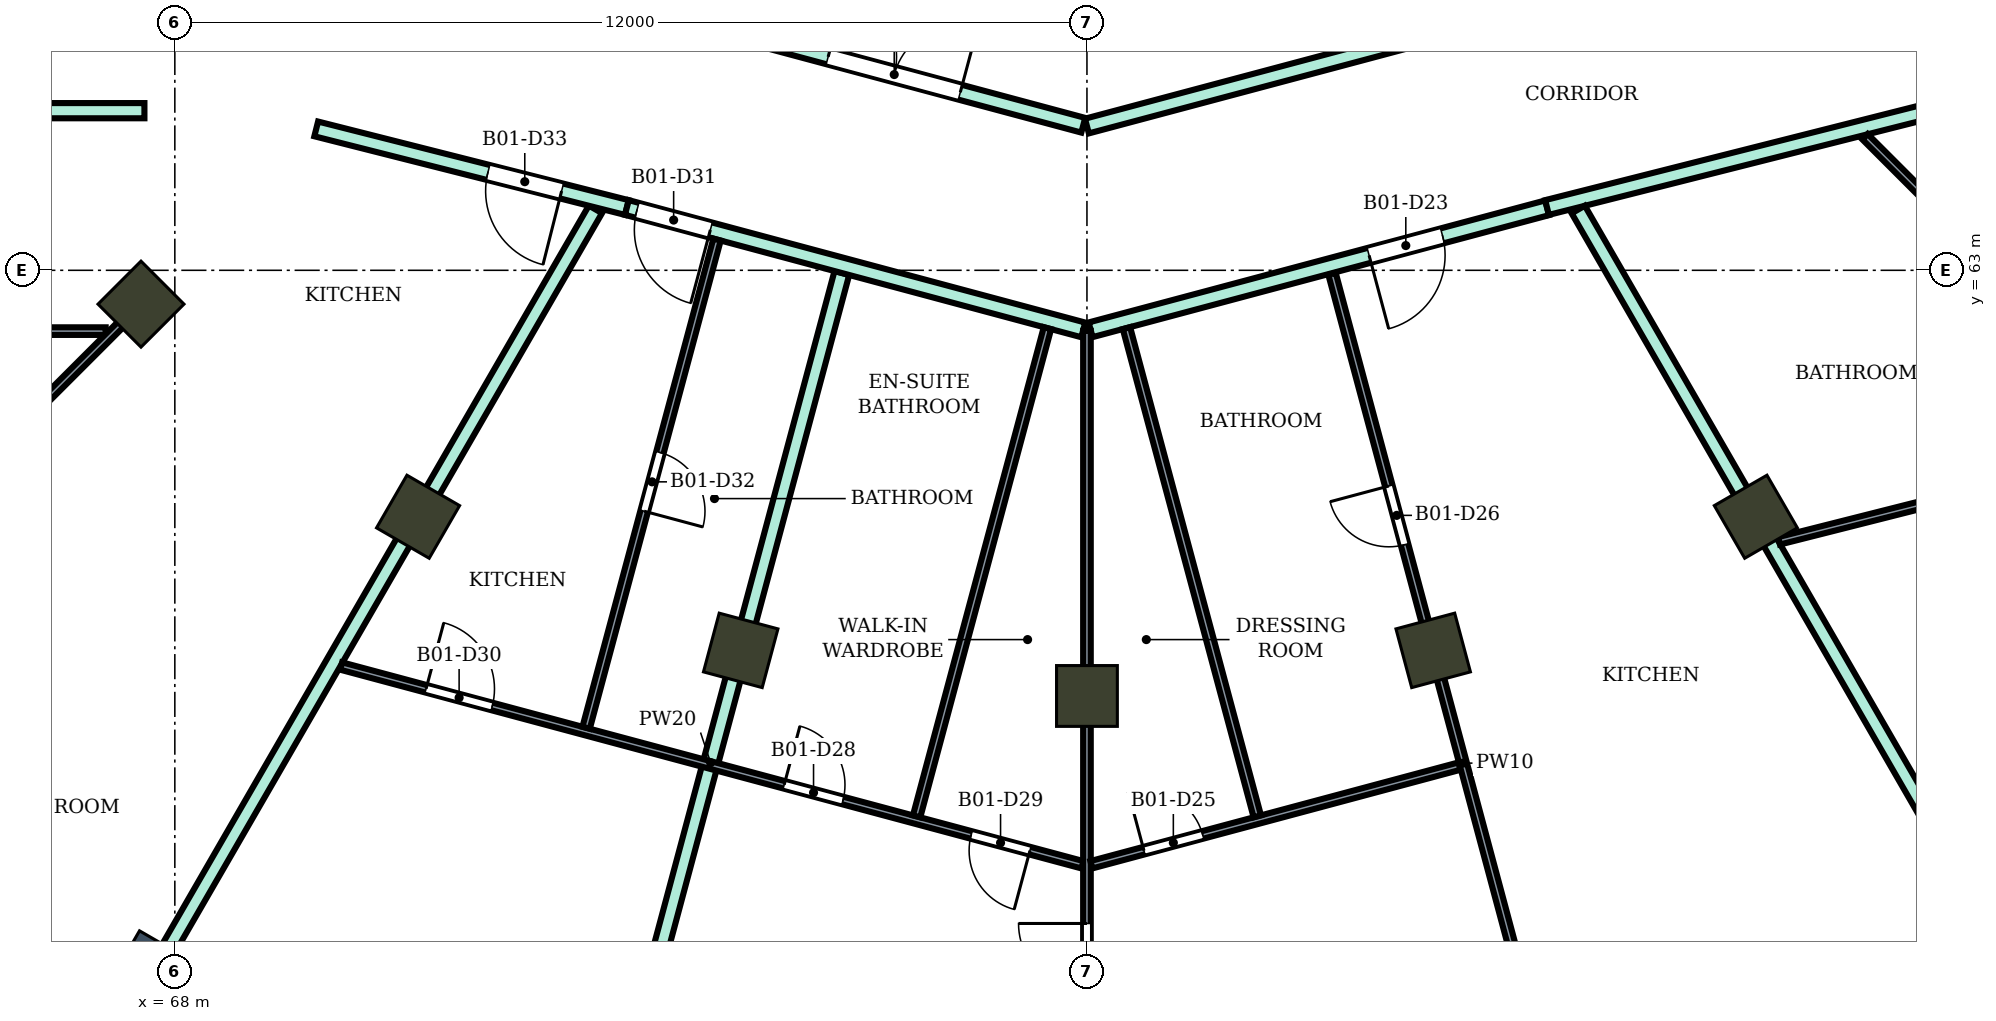
"""IFC4 building model, lengths in metres.
Left out: names, types, materials, properties, quantities, classifications, styles, units other than length and angle.
Written with IfcOpenShell. Run it as: python <this file> out.ifc"""

import sys

from ifc_helpers import new_model, si_unit, direction, frame, frame_2d, origin, origin_2d, place, context, subcontext, project, spatial, rectangle, extrude, element, fill, save


model = new_model("IFC4")
c1 = context("Model", 3, precision=1e-05, world=origin(), true_north=direction((0.0, 1.0)))
c2 = subcontext(c1, "Body", "Model", "MODEL_VIEW")
j1 = project(units=[si_unit("LENGTHUNIT", "METRE"), si_unit("PLANEANGLEUNIT", "RADIAN")], contexts=[c1])
p1 = place(None, origin())
s1 = spatial("IfcSite", under=j1, at=p1, CompositionType="ELEMENT")
p2 = place(p1, origin())
s2 = spatial("IfcBuilding", under=s1, at=p2, CompositionType="ELEMENT")
p3 = place(p2, frame((0.0, 0.0, 212.5)))
s3 = spatial("IfcBuildingStorey", under=s2, at=p3, CompositionType="ELEMENT", Elevation=212.5)
p4 = place(p3, frame((67.7, 53.696, 0.0), z_axis=(0.0, 0.0, 1.0), x_axis=(-0.5, -0.866025403784, 0.0)))
e1 = element("IfcColumn", 1, at=p4, inside=s3, PredefinedType="COLUMN", context=c2, shape_type="SweptSolid", body=[
    extrude(rectangle(XDim=0.9, YDim=0.9, at=origin_2d()), origin(), (0.0, 0.0, 1.0), 4.2),
])
for number, where, z_axis, x_axis in (
    (2, (67.555, 62.555, 0.0), (0.0, 0.0, 1.0), (-0.707, -0.707, 0.0)),
    (3, (71.2, 59.758, 0.0), (0.0, 0.0, 1.0), (-0.5, -0.866, 0.0)),
    (4, (75.445, 58.0, 0.0), (0.0, 0.0, 1.0), (-0.259, -0.966, 0.0)),
    (5, (80.0, 57.4, 0.0), (0.0, 0.0, 1.0), (0.0, -1.0, 0.0)),
    (6, (84.555, 58.0, 0.0), (0.0, 0.0, 1.0), (0.259, -0.966, 0.0)),
    (7, (88.8, 59.758, 0.0), (0.0, 0.0, 1.0), (0.5, -0.866, 0.0)),
):
    element("IfcColumn", number, at=place(p3, frame(where, z_axis=z_axis, x_axis=x_axis)), inside=s3, PredefinedType="COLUMN", context=c2, shape_type="SweptSolid", body=[
        extrude(rectangle(XDim=0.8, YDim=0.8, at=origin_2d()), origin(), (0.0, 0.0, 1.0), 4.2),
    ])
p5 = place(p3, frame((65.2, 65.1, 0.0), z_axis=(0.0, 0.0, 1.0), x_axis=(1.0, 0.0, 0.0)))
e8 = element("IfcWall", 8, at=p5, inside=s3, PredefinedType="PARTITIONING", context=c2, shape_type="SweptSolid", body=[
    extrude(rectangle(XDim=2.4, YDim=0.2, at=frame_2d((1.2, 0.0))), origin(), (0.0, 0.0, 1.0), 3.75),
])
p6 = place(p3, frame((67.099, 52.66, 0.0), z_axis=(0.0, 0.0, 1.0), x_axis=(0.500120472712, 0.865955837658, 0.0)))
e9 = element("IfcWall", 9, at=p6, inside=s3, PredefinedType="PARTITIONING", context=c2, shape_type="SweptSolid", body=[
    extrude(rectangle(XDim=12.866, YDim=0.2, at=frame_2d((6.433, 0.0))), origin(), (0.0, 0.0, 1.0), 3.75),
])
p7 = place(p3, frame((69.86, 64.86, 0.0), z_axis=(0.0, 0.0, 1.0), x_axis=(0.96942980222, -0.245368821506, 0.0)))
e10 = element("IfcWall", 10, at=p7, inside=s3, PredefinedType="PARTITIONING", context=c2, shape_type="SweptSolid", body=[
    extrude(rectangle(XDim=4.216, YDim=0.2, at=frame_2d((2.108, 0.0))), origin(), (0.0, 0.0, 1.0), 3.75),
])
p8 = place(p7, frame((2.331, 0.0, 0.0)))
e11 = element("IfcOpeningElement", 11, at=p8, cuts=e10, PredefinedType="OPENING", context=c2, shape_type="SweptSolid", body=[
    extrude(rectangle(XDim=1.0, YDim=2.1, at=frame_2d((0.5, 1.05))), frame((0.0, 0.11, 0.0), z_axis=(0.0, -1.0, 0.0), x_axis=(1.0, 0.0, 0.0)), (0.0, 0.0, 1.0), 0.22),
])
p9 = place(p3, frame((73.323, 50.081, 0.0), z_axis=(0.0, 0.0, 1.0), x_axis=(0.258837030899, 0.96592100683, 0.0)))
e12 = element("IfcWall", 12, at=p9, inside=s3, PredefinedType="PARTITIONING", context=c2, shape_type="SweptSolid", body=[
    extrude(rectangle(XDim=13.338, YDim=0.2, at=frame_2d((6.669, 0.0))), origin(), (0.0, 0.0, 1.0), 3.75),
])
p10 = place(p3, frame((73.947, 63.826, 0.0), z_axis=(0.0, 0.0, 1.0), x_axis=(0.965876152316, -0.259004359784, 0.0)))
e13 = element("IfcWall", 13, at=p10, inside=s3, PredefinedType="PARTITIONING", context=c2, shape_type="SweptSolid", body=[
    extrude(rectangle(XDim=6.217, YDim=0.2, at=frame_2d((3.108, 0.0))), origin(), (0.0, 0.0, 1.0), 3.75),
])
p11 = place(p10, frame((0.137, 0.0, 0.0)))
e14 = element("IfcOpeningElement", 14, at=p11, cuts=e13, PredefinedType="OPENING", context=c2, shape_type="SweptSolid", body=[
    extrude(rectangle(XDim=1.0, YDim=2.1, at=frame_2d((0.5, 1.05))), frame((0.0, 0.11, 0.0), z_axis=(0.0, -1.0, 0.0), x_axis=(1.0, 0.0, 0.0)), (0.0, 0.0, 1.0), 0.22),
])
p12 = place(p3, frame((74.603, 66.342, 0.0), z_axis=(0.0, 0.0, 1.0), x_axis=(0.965895298152, -0.258932950796, 0.0)))
e15 = element("IfcWall", 15, at=p12, inside=s3, PredefinedType="PARTITIONING", context=c2, shape_type="SweptSolid", body=[
    extrude(rectangle(XDim=5.538, YDim=0.2, at=frame_2d((2.769, 0.0))), origin(), (0.0, 0.0, 1.0), 3.75),
])
p13 = place(p12, frame((2.062, 0.0, 0.0)))
e16 = element("IfcOpeningElement", 16, at=p13, cuts=e15, PredefinedType="OPENING", context=c2, shape_type="SweptSolid", body=[
    extrude(rectangle(XDim=1.8, YDim=2.1, at=frame_2d((0.9, 1.05))), frame((0.0, 0.11, 0.0), z_axis=(0.0, -1.0, 0.0), x_axis=(1.0, 0.0, 0.0)), (0.0, 0.0, 1.0), 0.22),
])
p14 = place(p3, frame((80.0, 64.898, 0.0), z_axis=(0.0, 0.0, 1.0), x_axis=(0.966237419782, 0.257653349704, 0.0)))
e17 = element("IfcWall", 17, at=p14, inside=s3, PredefinedType="PARTITIONING", context=c2, shape_type="SweptSolid", body=[
    extrude(rectangle(XDim=8.169, YDim=0.2, at=frame_2d((4.084, 0.0))), origin(), (0.0, 0.0, 1.0), 3.75),
])
p15 = place(p14, frame((6.428, 0.0, 0.0)))
e18 = element("IfcOpeningElement", 18, at=p15, cuts=e17, PredefinedType="OPENING", context=c2, shape_type="SweptSolid", body=[
    extrude(rectangle(XDim=0.9, YDim=2.1, at=frame_2d((0.45, 1.05))), frame((0.0, 0.11, 0.0), z_axis=(0.0, -1.0, 0.0), x_axis=(1.0, 0.0, 0.0)), (0.0, 0.0, 1.0), 0.22),
])
p16 = place(p3, frame((80.048, 62.217, 0.0), z_axis=(0.0, 0.0, 1.0), x_axis=(0.966097920642, 0.258175923996, 0.0)))
e19 = element("IfcWall", 19, at=p16, inside=s3, PredefinedType="PARTITIONING", context=c2, shape_type="SweptSolid", body=[
    extrude(rectangle(XDim=6.217, YDim=0.2, at=frame_2d((3.108, 0.0))), origin(), (0.0, 0.0, 1.0), 3.75),
])
p17 = place(p16, frame((3.792, 0.0, 0.0)))
e20 = element("IfcOpeningElement", 20, at=p17, cuts=e19, PredefinedType="OPENING", context=c2, shape_type="SweptSolid", body=[
    extrude(rectangle(XDim=1.0, YDim=2.1, at=frame_2d((0.5, 1.05))), frame((0.0, 0.11, 0.0), z_axis=(0.0, -1.0, 0.0), x_axis=(1.0, 0.0, 0.0)), (0.0, 0.0, 1.0), 0.22),
])
p18 = place(p3, frame((86.053, 63.826, 0.0), z_axis=(0.0, 0.0, 1.0), x_axis=(0.969490004987, 0.245130843083, 0.0)))
e21 = element("IfcWall", 21, at=p18, inside=s3, PredefinedType="PARTITIONING", context=c2, shape_type="SweptSolid", body=[
    extrude(rectangle(XDim=5.908, YDim=0.2, at=frame_2d((2.954, 0.0))), origin(), (0.0, 0.0, 1.0), 3.75),
])
p19 = place(p3, frame((86.463, 63.8, 0.0), z_axis=(0.0, 0.0, 1.0), x_axis=(0.499827034849, -0.866125242234, 0.0)))
e22 = element("IfcWall", 22, at=p19, inside=s3, PredefinedType="PARTITIONING", context=c2, shape_type="SweptSolid", body=[
    extrude(rectangle(XDim=12.866, YDim=0.2, at=frame_2d((6.433, 0.0))), origin(), (0.0, 0.0, 1.0), 3.75),
])
p20 = place(p3, frame((61.2, 62.2, 0.0), z_axis=(0.0, 0.0, 1.0), x_axis=(1.0, 0.0, 0.0)))
e23 = element("IfcWall", 23, at=p20, inside=s3, PredefinedType="PARTITIONING", context=c2, shape_type="SweptSolid", body=[
    extrude(rectangle(XDim=5.89, YDim=0.1, at=frame_2d((2.945, 0.0))), origin(), (0.0, 0.0, 1.0), 3.75),
])
p21 = place(p20, frame((2.6, 0.0, 0.0)))
e24 = element("IfcOpeningElement", 24, at=p21, cuts=e23, PredefinedType="OPENING", context=c2, shape_type="SweptSolid", body=[
    extrude(rectangle(XDim=0.8, YDim=2.1, at=frame_2d((0.4, 1.05))), frame((0.0, 0.06, 0.0), z_axis=(0.0, -1.0, 0.0), x_axis=(1.0, 0.0, 0.0)), (0.0, 0.0, 1.0), 0.12),
])
p22 = place(p3, frame((63.596, 58.596, 0.0), z_axis=(0.0, 0.0, 1.0), x_axis=(0.707106781187, 0.707106781187, 0.0)))
e25 = element("IfcWall", 25, at=p22, inside=s3, PredefinedType="PARTITIONING", context=c2, shape_type="SweptSolid", body=[
    extrude(rectangle(XDim=5.663, YDim=0.1, at=frame_2d((2.832, 0.0))), origin(), (0.0, 0.0, 1.0), 3.75),
])
p23 = place(p22, frame((2.134, 0.0, 0.0)))
e26 = element("IfcOpeningElement", 26, at=p23, cuts=e25, PredefinedType="OPENING", context=c2, shape_type="SweptSolid", body=[
    extrude(rectangle(XDim=0.9, YDim=2.1, at=frame_2d((0.45, 1.05))), frame((0.0, 0.06, 0.0), z_axis=(0.0, -1.0, 0.0), x_axis=(1.0, 0.0, 0.0)), (0.0, 0.0, 1.0), 0.12),
])
p24 = place(p3, frame((70.188, 57.794, 0.0), z_axis=(0.0, 0.0, 1.0), x_axis=(0.965894620005, -0.25893548047, 0.0)))
e27 = element("IfcWall", 27, at=p24, inside=s3, PredefinedType="PARTITIONING", context=c2, shape_type="SweptSolid", body=[
    extrude(rectangle(XDim=10.098, YDim=0.1, at=frame_2d((5.049, 0.0))), origin(), (0.0, 0.0, 1.0), 3.75),
])
p25 = place(p24, frame((6.034, 0.0, 0.0)))
e28 = element("IfcOpeningElement", 28, at=p25, cuts=e27, PredefinedType="OPENING", context=c2, shape_type="SweptSolid", body=[
    extrude(rectangle(XDim=0.8, YDim=2.1, at=frame_2d((0.4, 1.05))), frame((0.0, 0.06, 0.0), z_axis=(0.0, -1.0, 0.0), x_axis=(1.0, 0.0, 0.0)), (0.0, 0.0, 1.0), 0.12),
])
p26 = place(p24, frame((8.581, 0.0, 0.0)))
e29 = element("IfcOpeningElement", 29, at=p26, cuts=e27, PredefinedType="OPENING", context=c2, shape_type="SweptSolid", body=[
    extrude(rectangle(XDim=0.8, YDim=2.1, at=frame_2d((0.4, 1.05))), frame((0.0, 0.06, 0.0), z_axis=(0.0, -1.0, 0.0), x_axis=(1.0, 0.0, 0.0)), (0.0, 0.0, 1.0), 0.12),
])
p27 = place(p24, frame((1.156, 0.0, 0.0)))
e30 = element("IfcOpeningElement", 30, at=p27, cuts=e27, PredefinedType="OPENING", context=c2, shape_type="SweptSolid", body=[
    extrude(rectangle(XDim=0.9, YDim=2.1, at=frame_2d((0.45, 1.05))), frame((0.0, 0.06, 0.0), z_axis=(0.0, -1.0, 0.0), x_axis=(1.0, 0.0, 0.0)), (0.0, 0.0, 1.0), 0.12),
])
p28 = place(p3, frame((73.411, 56.982, 0.0), z_axis=(0.0, 0.0, 1.0), x_axis=(0.258992397652, 0.96587935994, 0.0)))
e31 = element("IfcWall", 31, at=p28, inside=s3, PredefinedType="PARTITIONING", context=c2, shape_type="SweptSolid", body=[
    extrude(rectangle(XDim=6.649, YDim=0.1, at=frame_2d((3.325, 0.0))), origin(), (0.0, 0.0, 1.0), 3.75),
])
p29 = place(p28, frame((2.95, 0.0, 0.0)))
e32 = element("IfcOpeningElement", 32, at=p29, cuts=e31, PredefinedType="OPENING", context=c2, shape_type="SweptSolid", body=[
    extrude(rectangle(XDim=0.8, YDim=2.1, at=frame_2d((0.4, 1.05))), frame((0.0, 0.06, 0.0), z_axis=(0.0, -1.0, 0.0), x_axis=(1.0, 0.0, 0.0)), (0.0, 0.0, 1.0), 0.12),
])
p30 = place(p3, frame((77.759, 55.816, 0.0), z_axis=(0.0, 0.0, 1.0), x_axis=(0.258802763352, 0.965930188824, 0.0)))
e33 = element("IfcWall", 33, at=p30, inside=s3, PredefinedType="PARTITIONING", context=c2, shape_type="SweptSolid", body=[
    extrude(rectangle(XDim=6.65, YDim=0.1, at=frame_2d((3.325, 0.0))), origin(), (0.0, 0.0, 1.0), 3.75),
])
p31 = place(p3, frame((80.0, 51.8, 0.0), z_axis=(0.0, 0.0, 1.0), x_axis=(0.0, 1.0, 0.0)))
e34 = element("IfcWall", 34, at=p31, inside=s3, PredefinedType="PARTITIONING", context=c2, shape_type="SweptSolid", body=[
    extrude(rectangle(XDim=10.404, YDim=0.1, at=frame_2d((5.202, 0.0))), origin(), (0.0, 0.0, 1.0), 3.75),
])
p32 = place(p31, frame((1.707, 0.0, 0.0)))
e35 = element("IfcOpeningElement", 35, at=p32, cuts=e34, PredefinedType="OPENING", context=c2, shape_type="SweptSolid", body=[
    extrude(rectangle(XDim=0.9, YDim=2.1, at=frame_2d((0.45, 1.05))), frame((0.0, 0.06, 0.0), z_axis=(0.0, -1.0, 0.0), x_axis=(1.0, 0.0, 0.0)), (0.0, 0.0, 1.0), 0.12),
])
p33 = place(p3, frame((80.058, 55.179, 0.0), z_axis=(0.0, 0.0, 1.0), x_axis=(0.965917403523, 0.258850477246, 0.0)))
e36 = element("IfcWall", 36, at=p33, inside=s3, PredefinedType="PARTITIONING", context=c2, shape_type="SweptSolid", body=[
    extrude(rectangle(XDim=5.014, YDim=0.1, at=frame_2d((2.507, 0.0))), origin(), (0.0, 0.0, 1.0), 3.75),
])
p34 = place(p33, frame((0.717, 0.0, 0.0)))
e37 = element("IfcOpeningElement", 37, at=p34, cuts=e36, PredefinedType="OPENING", context=c2, shape_type="SweptSolid", body=[
    extrude(rectangle(XDim=0.8, YDim=2.1, at=frame_2d((0.4, 1.05))), frame((0.0, 0.06, 0.0), z_axis=(0.0, -1.0, 0.0), x_axis=(1.0, 0.0, 0.0)), (0.0, 0.0, 1.0), 0.12),
])
p35 = place(p3, frame((80.52, 62.24, 0.0), z_axis=(0.0, 0.0, 1.0), x_axis=(0.258802763352, -0.965930188824, 0.0)))
e38 = element("IfcWall", 38, at=p35, inside=s3, PredefinedType="PARTITIONING", context=c2, shape_type="SweptSolid", body=[
    extrude(rectangle(XDim=6.65, YDim=0.1, at=frame_2d((3.325, 0.0))), origin(), (0.0, 0.0, 1.0), 3.75),
])
p36 = place(p3, frame((83.224, 62.954, 0.0), z_axis=(0.0, 0.0, 1.0), x_axis=(0.258647574365, -0.965971755423, 0.0)))
e39 = element("IfcWall", 39, at=p36, inside=s3, PredefinedType="PARTITIONING", context=c2, shape_type="SweptSolid", body=[
    extrude(rectangle(XDim=13.328, YDim=0.1, at=frame_2d((6.664, 0.0))), origin(), (0.0, 0.0, 1.0), 3.75),
])
p37 = place(p36, frame((9.534, 0.0, 0.0)))
e40 = element("IfcOpeningElement", 40, at=p37, cuts=e39, PredefinedType="OPENING", context=c2, shape_type="SweptSolid", body=[
    extrude(rectangle(XDim=0.9, YDim=2.1, at=frame_2d((0.45, 1.05))), frame((0.0, 0.06, 0.0), z_axis=(0.0, -1.0, 0.0), x_axis=(1.0, 0.0, 0.0)), (0.0, 0.0, 1.0), 0.12),
])
p38 = place(p36, frame((2.89, 0.0, 0.0)))
e41 = element("IfcOpeningElement", 41, at=p38, cuts=e39, PredefinedType="OPENING", context=c2, shape_type="SweptSolid", body=[
    extrude(rectangle(XDim=0.8, YDim=2.1, at=frame_2d((0.4, 1.05))), frame((0.0, 0.06, 0.0), z_axis=(0.0, -1.0, 0.0), x_axis=(1.0, 0.0, 0.0)), (0.0, 0.0, 1.0), 0.12),
])
p39 = place(p3, frame((89.106, 59.441, 0.0), z_axis=(0.0, 0.0, 1.0), x_axis=(0.969462385749, 0.245240051009, 0.0)))
e42 = element("IfcWall", 42, at=p39, inside=s3, PredefinedType="PARTITIONING", context=c2, shape_type="SweptSolid", body=[
    extrude(rectangle(XDim=5.223, YDim=0.1, at=frame_2d((2.612, 0.0))), origin(), (0.0, 0.0, 1.0), 3.75),
])
p40 = place(p3, frame((90.236, 64.758, 0.0), z_axis=(0.0, 0.0, 1.0), x_axis=(0.706938769128, -0.707274753334, 0.0)))
e43 = element("IfcWall", 43, at=p40, inside=s3, PredefinedType="PARTITIONING", context=c2, shape_type="SweptSolid", body=[
    extrude(rectangle(XDim=8.72, YDim=0.1, at=frame_2d((4.36, 0.0))), origin(), (0.0, 0.0, 1.0), 3.75),
])
p41 = place(p40, frame((6.115, 0.0, 0.0)))
e44 = element("IfcOpeningElement", 44, at=p41, cuts=e43, PredefinedType="OPENING", context=c2, shape_type="SweptSolid", body=[
    extrude(rectangle(XDim=0.9, YDim=2.1, at=frame_2d((0.45, 1.05))), frame((0.0, 0.06, 0.0), z_axis=(0.0, -1.0, 0.0), x_axis=(1.0, 0.0, 0.0)), (0.0, 0.0, 1.0), 0.12),
])
p42 = place(p40, frame((1.817, 0.0, 0.0)))
e45 = element("IfcOpeningElement", 45, at=p42, cuts=e43, PredefinedType="OPENING", context=c2, shape_type="SweptSolid", body=[
    extrude(rectangle(XDim=0.8, YDim=2.1, at=frame_2d((0.4, 1.05))), frame((0.0, 0.06, 0.0), z_axis=(0.0, -1.0, 0.0), x_axis=(1.0, 0.0, 0.0)), (0.0, 0.0, 1.0), 0.12),
])
p43 = place(p17, frame((1.0, 0.0, 0.0), z_axis=(0.0, 0.0, 1.0), x_axis=(-1.0, 0.0, 0.0)))
e46 = element("IfcDoor", 46, at=p43, inside=s3, OperationType="SINGLE_SWING_RIGHT", PredefinedType="DOOR", context=c2, shape_type="SweptSolid", body=[
    extrude(rectangle(XDim=1.0, YDim=2.1, at=frame_2d((0.5, 1.05))), frame((0.0, 0.025, 0.0), z_axis=(0.0, -1.0, 0.0), x_axis=(1.0, 0.0, 0.0)), (0.0, 0.0, 1.0), 0.05),
])
fill(e20, e46)
p44 = place(p34, origin())
e47 = element("IfcDoor", 47, at=p44, inside=s3, OperationType="SINGLE_SWING_LEFT", PredefinedType="DOOR", context=c2, shape_type="SweptSolid", body=[
    extrude(rectangle(XDim=0.8, YDim=2.1, at=frame_2d((0.4, 1.05))), frame((0.0, 0.025, 0.0), z_axis=(0.0, -1.0, 0.0), x_axis=(1.0, 0.0, 0.0)), (0.0, 0.0, 1.0), 0.05),
])
fill(e37, e47)
p45 = place(p38, frame((0.8, 0.0, 0.0), z_axis=(0.0, 0.0, 1.0), x_axis=(-1.0, 0.0, 0.0)))
e48 = element("IfcDoor", 48, at=p45, inside=s3, OperationType="SINGLE_SWING_RIGHT", PredefinedType="DOOR", context=c2, shape_type="SweptSolid", body=[
    extrude(rectangle(XDim=0.8, YDim=2.1, at=frame_2d((0.4, 1.05))), frame((0.0, 0.025, 0.0), z_axis=(0.0, -1.0, 0.0), x_axis=(1.0, 0.0, 0.0)), (0.0, 0.0, 1.0), 0.05),
])
fill(e41, e48)
p46 = place(p32, origin())
e49 = element("IfcDoor", 49, at=p46, inside=s3, OperationType="SINGLE_SWING_RIGHT", PredefinedType="DOOR", context=c2, shape_type="SweptSolid", body=[
    extrude(rectangle(XDim=0.9, YDim=2.1, at=frame_2d((0.45, 1.05))), frame((0.0, 0.025, 0.0), z_axis=(0.0, -1.0, 0.0), x_axis=(1.0, 0.0, 0.0)), (0.0, 0.0, 1.0), 0.05),
])
fill(e35, e49)
p47 = place(p25, origin())
e50 = element("IfcDoor", 50, at=p47, inside=s3, OperationType="SINGLE_SWING_LEFT", PredefinedType="DOOR", context=c2, shape_type="SweptSolid", body=[
    extrude(rectangle(XDim=0.8, YDim=2.1, at=frame_2d((0.4, 1.05))), frame((0.0, 0.025, 0.0), z_axis=(0.0, -1.0, 0.0), x_axis=(1.0, 0.0, 0.0)), (0.0, 0.0, 1.0), 0.05),
])
fill(e28, e50)
p48 = place(p26, frame((0.8, 0.0, 0.0), z_axis=(0.0, 0.0, 1.0), x_axis=(-1.0, 0.0, 0.0)))
e51 = element("IfcDoor", 51, at=p48, inside=s3, OperationType="SINGLE_SWING_LEFT", PredefinedType="DOOR", context=c2, shape_type="SweptSolid", body=[
    extrude(rectangle(XDim=0.8, YDim=2.1, at=frame_2d((0.4, 1.05))), frame((0.0, 0.025, 0.0), z_axis=(0.0, -1.0, 0.0), x_axis=(1.0, 0.0, 0.0)), (0.0, 0.0, 1.0), 0.05),
])
fill(e29, e51)
p49 = place(p27, origin())
e52 = element("IfcDoor", 52, at=p49, inside=s3, OperationType="SINGLE_SWING_LEFT", PredefinedType="DOOR", context=c2, shape_type="SweptSolid", body=[
    extrude(rectangle(XDim=0.9, YDim=2.1, at=frame_2d((0.45, 1.05))), frame((0.0, 0.025, 0.0), z_axis=(0.0, -1.0, 0.0), x_axis=(1.0, 0.0, 0.0)), (0.0, 0.0, 1.0), 0.05),
])
fill(e30, e52)
p50 = place(p11, frame((1.0, 0.0, 0.0), z_axis=(0.0, 0.0, 1.0), x_axis=(-1.0, 0.0, 0.0)))
e53 = element("IfcDoor", 53, at=p50, inside=s3, OperationType="SINGLE_SWING_LEFT", PredefinedType="DOOR", context=c2, shape_type="SweptSolid", body=[
    extrude(rectangle(XDim=1.0, YDim=2.1, at=frame_2d((0.5, 1.05))), frame((0.0, 0.025, 0.0), z_axis=(0.0, -1.0, 0.0), x_axis=(1.0, 0.0, 0.0)), (0.0, 0.0, 1.0), 0.05),
])
fill(e14, e53)
p51 = place(p29, frame((0.8, 0.0, 0.0), z_axis=(0.0, 0.0, 1.0), x_axis=(-1.0, 0.0, 0.0)))
e54 = element("IfcDoor", 54, at=p51, inside=s3, OperationType="SINGLE_SWING_RIGHT", PredefinedType="DOOR", context=c2, shape_type="SweptSolid", body=[
    extrude(rectangle(XDim=0.8, YDim=2.1, at=frame_2d((0.4, 1.05))), frame((0.0, 0.025, 0.0), z_axis=(0.0, -1.0, 0.0), x_axis=(1.0, 0.0, 0.0)), (0.0, 0.0, 1.0), 0.05),
])
fill(e32, e54)
p52 = place(p8, frame((1.0, 0.0, 0.0), z_axis=(0.0, 0.0, 1.0), x_axis=(-1.0, 0.0, 0.0)))
e55 = element("IfcDoor", 55, at=p52, inside=s3, OperationType="SINGLE_SWING_LEFT", PredefinedType="DOOR", context=c2, shape_type="SweptSolid", body=[
    extrude(rectangle(XDim=1.0, YDim=2.1, at=frame_2d((0.5, 1.05))), frame((0.0, 0.025, 0.0), z_axis=(0.0, -1.0, 0.0), x_axis=(1.0, 0.0, 0.0)), (0.0, 0.0, 1.0), 0.05),
])
fill(e11, e55)
p53 = place(p13, origin())
e56 = element("IfcDoor", 56, at=p53, inside=s3, OperationType="DOUBLE_DOOR_SINGLE_SWING", PredefinedType="DOOR", context=c2, shape_type="SweptSolid", body=[
    extrude(rectangle(XDim=1.8, YDim=2.1, at=frame_2d((0.9, 1.05))), frame((0.0, 0.025, 0.0), z_axis=(0.0, -1.0, 0.0), x_axis=(1.0, 0.0, 0.0)), (0.0, 0.0, 1.0), 0.05),
])
fill(e16, e56)
save(model, sys.argv[1])
